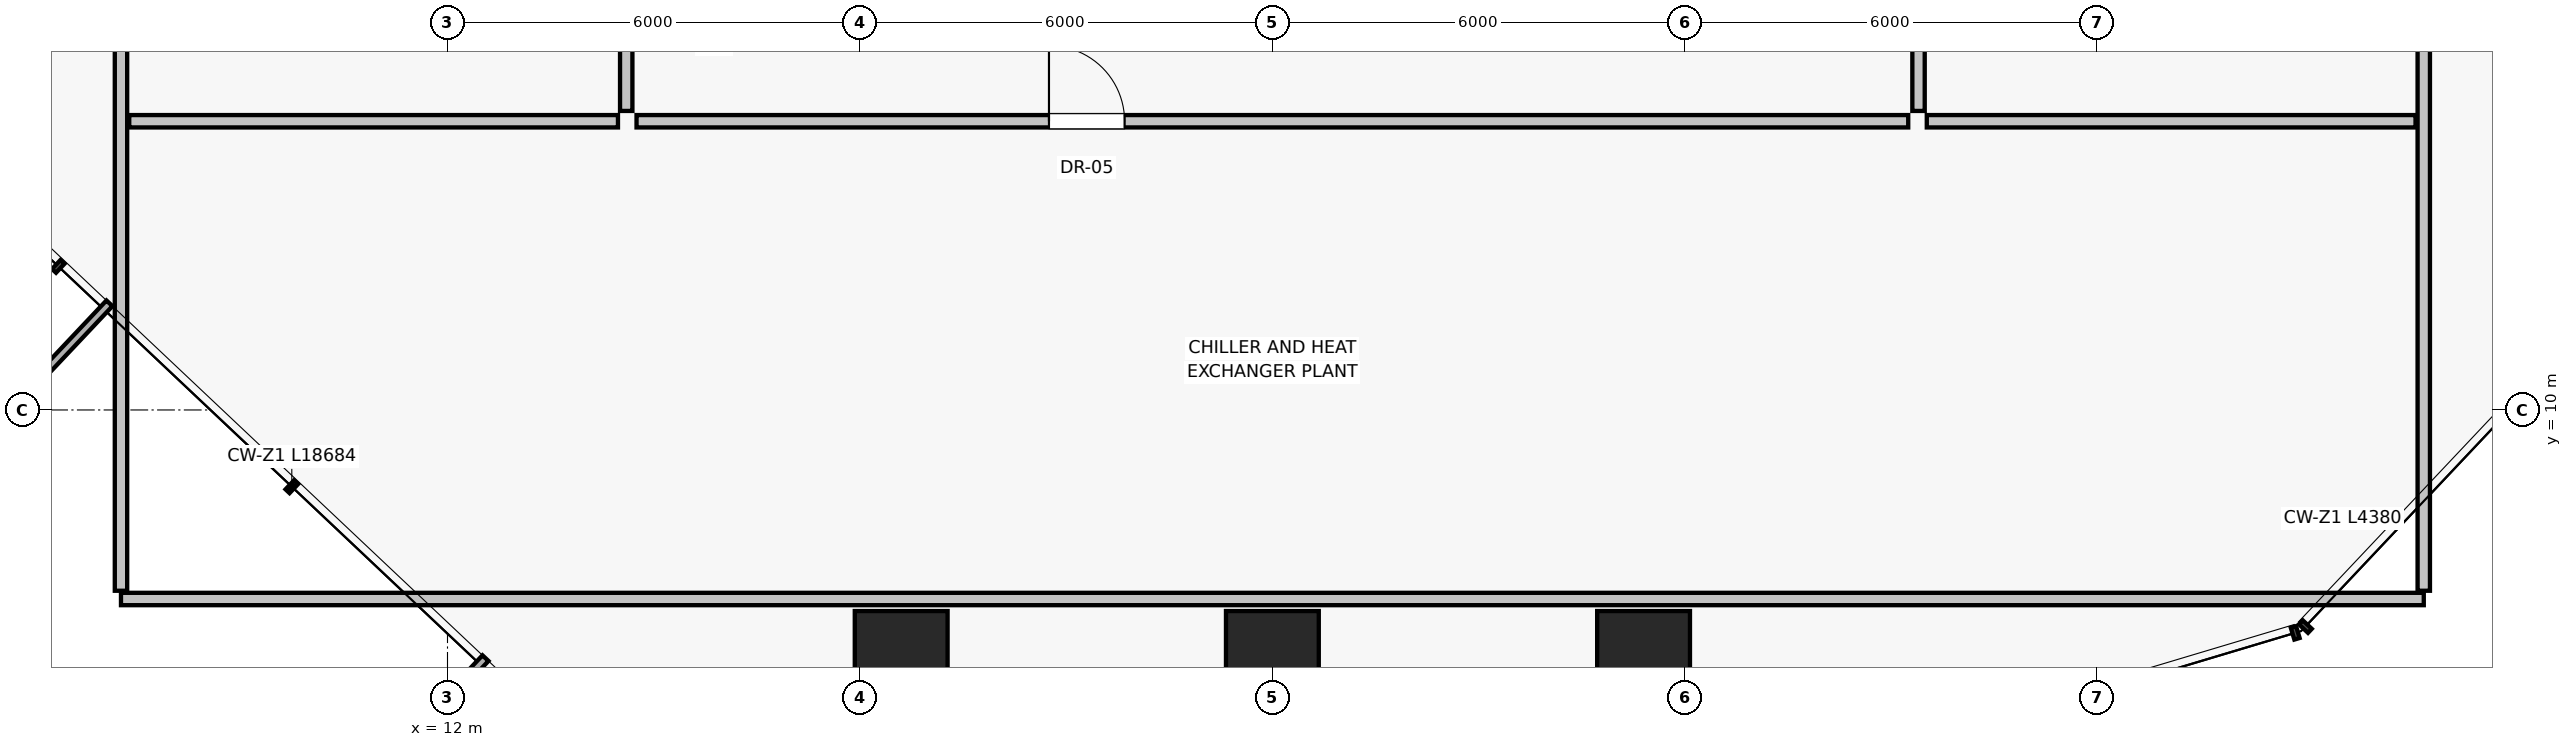
"""IFC4 building model, lengths in metres.
Left out: names, types, materials, properties, quantities, classifications, styles, units other than length and angle.
Written with IfcOpenShell. Run it as: python <this file> out.ifc"""

import sys

from ifc_helpers import new_model, si_unit, direction, frame, frame_2d, origin, origin_2d, place, context, subcontext, project, spatial, rectangle, extrude, source, transform, mapped, element, fill, save


model = new_model("IFC4")
c1 = context("Model", 3, precision=1e-05, world=origin(), true_north=direction((0.0, 1.0)))
c2 = subcontext(c1, "Body", "Model", "MODEL_VIEW")
j1 = project(units=[si_unit("LENGTHUNIT", "METRE"), si_unit("PLANEANGLEUNIT", "RADIAN")], contexts=[c1])
p1 = place(None, origin())
s1 = spatial("IfcSite", under=j1, at=p1, CompositionType="ELEMENT")
p2 = place(p1, origin())
s2 = spatial("IfcBuilding", under=s1, at=p2, CompositionType="ELEMENT")
p3 = place(p2, frame((0.0, 0.0, 80.35)))
s3 = spatial("IfcBuildingStorey", under=s2, at=p3, CompositionType="ELEMENT", Elevation=80.35)
for number, where, z_axis, x_axis in (
    (1, (18.6, 6.4, 0.0), (0.0, 0.0, 1.0), (1.0, 0.0, 0.0)),
    (2, (24.0, 6.4, 0.0), (0.0, 0.0, 1.0), (1.0, 0.0, 0.0)),
    (3, (29.4, 6.4, 0.0), (0.0, 0.0, 1.0), (1.0, 0.0, 0.0)),
):
    element("IfcColumn", number, at=place(p3, frame(where, z_axis=z_axis, x_axis=x_axis)), inside=s3, PredefinedType="COLUMN", context=c2, shape_type="SweptSolid", body=[
        extrude(rectangle(XDim=1.35, YDim=1.35, at=origin_2d()), origin(), (0.0, 0.0, 1.0), 4.8),
    ])
p4 = place(p3, frame((14.75, 14.2, 0.0), z_axis=(0.0, 0.0, 1.0), x_axis=(1.0, 0.0, 0.0)))
e4 = element("IfcWall", 4, at=p4, inside=s3, PredefinedType="PARTITIONING", context=c2, shape_type="SweptSolid", body=[
    extrude(rectangle(XDim=18.5, YDim=0.18, at=frame_2d((9.25, 0.0))), origin(), (0.0, 0.0, 1.0), 4.48),
])
p5 = place(p4, frame((6.0, 0.0, 0.0)))
e5 = element("IfcOpeningElement", 5, at=p5, cuts=e4, PredefinedType="OPENING", context=c2, shape_type="SweptSolid", body=[
    extrude(rectangle(XDim=1.1, YDim=2.03, at=frame_2d((0.55, 1.015))), frame((0.0, 0.1, 0.0), z_axis=(0.0, -1.0, 0.0), x_axis=(1.0, 0.0, 0.0)), (0.0, 0.0, 1.0), 0.2),
])
p6 = place(p3, frame((33.4, 14.35, 0.0), z_axis=(0.0, 0.0, 1.0), x_axis=(0.0, 1.0, 0.0)))
e6 = element("IfcWall", 6, at=p6, inside=s3, PredefinedType="PARTITIONING", context=c2, shape_type="SweptSolid", body=[
    extrude(rectangle(XDim=19.1, YDim=0.18, at=frame_2d((9.55, 0.0))), origin(), (0.0, 0.0, 1.0), 4.48),
])
p7 = place(p6, frame((6.0, 0.0, 0.0)))
e7 = element("IfcOpeningElement", 7, at=p7, cuts=e6, PredefinedType="OPENING", context=c2, shape_type="SweptSolid", body=[
    extrude(rectangle(XDim=1.3, YDim=2.3, at=frame_2d((0.65, 1.15))), frame((0.0, 0.1, 0.0), z_axis=(0.0, -1.0, 0.0), x_axis=(1.0, 0.0, 0.0)), (0.0, 0.0, 1.0), 0.2),
])
p8 = place(p3, frame((14.6, 14.35, 0.0), z_axis=(0.0, 0.0, 1.0), x_axis=(0.0, 1.0, 0.0)))
e8 = element("IfcWall", 8, at=p8, inside=s3, PredefinedType="PARTITIONING", context=c2, shape_type="SweptSolid", body=[
    extrude(rectangle(XDim=19.1, YDim=0.18, at=frame_2d((9.55, 0.0))), origin(), (0.0, 0.0, 1.0), 4.48),
])
p9 = place(p8, frame((6.0, 0.0, 0.0)))
e9 = element("IfcOpeningElement", 9, at=p9, cuts=e8, PredefinedType="OPENING", context=c2, shape_type="SweptSolid", body=[
    extrude(rectangle(XDim=1.3, YDim=2.3, at=frame_2d((0.65, 1.15))), frame((0.0, 0.1, 0.0), z_axis=(0.0, -1.0, 0.0), x_axis=(1.0, 0.0, 0.0)), (0.0, 0.0, 1.0), 0.2),
])
p10 = place(p3, frame((7.25, 7.25, 0.0), z_axis=(0.0, 0.0, 1.0), x_axis=(1.0, 0.0, 0.0)))
e10 = element("IfcWall", 10, at=p10, inside=s3, PredefinedType="PARTITIONING", context=c2, shape_type="SweptSolid", body=[
    extrude(rectangle(XDim=33.5, YDim=0.18, at=frame_2d((16.75, 0.0))), origin(), (0.0, 0.0, 1.0), 4.48),
])
for number, where, z_axis, x_axis in (
    (11, (7.25, 7.37, 0.0), (0.0, 0.0, 1.0), (0.0, 1.0, 0.0)),
    (12, (40.75, 7.37, 0.0), (0.0, 0.0, 1.0), (0.0, 1.0, 0.0)),
):
    element("IfcWall", number, at=place(p3, frame(where, z_axis=z_axis, x_axis=x_axis)), inside=s3, PredefinedType="PARTITIONING", context=c2, shape_type="SweptSolid", body=[
        extrude(rectangle(XDim=33.26, YDim=0.18, at=frame_2d((16.63, 0.0))), origin(), (0.0, 0.0, 1.0), 2.28),
    ])
for number, where, z_axis, x_axis in (
    (13, (7.37, 14.2, 0.0), (0.0, 0.0, 1.0), (1.0, 0.0, 0.0)),
    (14, (33.52, 14.2, 0.0), (0.0, 0.0, 1.0), (1.0, 0.0, 0.0)),
):
    element("IfcWall", number, at=place(p3, frame(where, z_axis=z_axis, x_axis=x_axis)), inside=s3, PredefinedType="PARTITIONING", context=c2, shape_type="SweptSolid", body=[
        extrude(rectangle(XDim=7.11, YDim=0.18, at=frame_2d((3.555, 0.0))), origin(), (0.0, 0.0, 1.0), 4.48),
    ])
m1 = source(origin(), c2, "Body", "SweptSolid", [
    extrude(rectangle(XDim=1.1, YDim=2.03, at=frame_2d((0.55, 1.015))), frame((0.0, 0.025, 0.0), z_axis=(0.0, -1.0, 0.0), x_axis=(1.0, 0.0, 0.0)), (0.0, 0.0, 1.0), 0.05),
])
p11 = place(p5, origin())
e15 = element("IfcDoor", 15, at=p11, inside=s3, OperationType="SINGLE_SWING_LEFT", PredefinedType="DOOR", context=c2, shape_type="MappedRepresentation", body=[
    mapped(m1, transform((0.0, 0.0, 0.0), scale=1.0)),
])
fill(e5, e15)
save(model, sys.argv[1])
